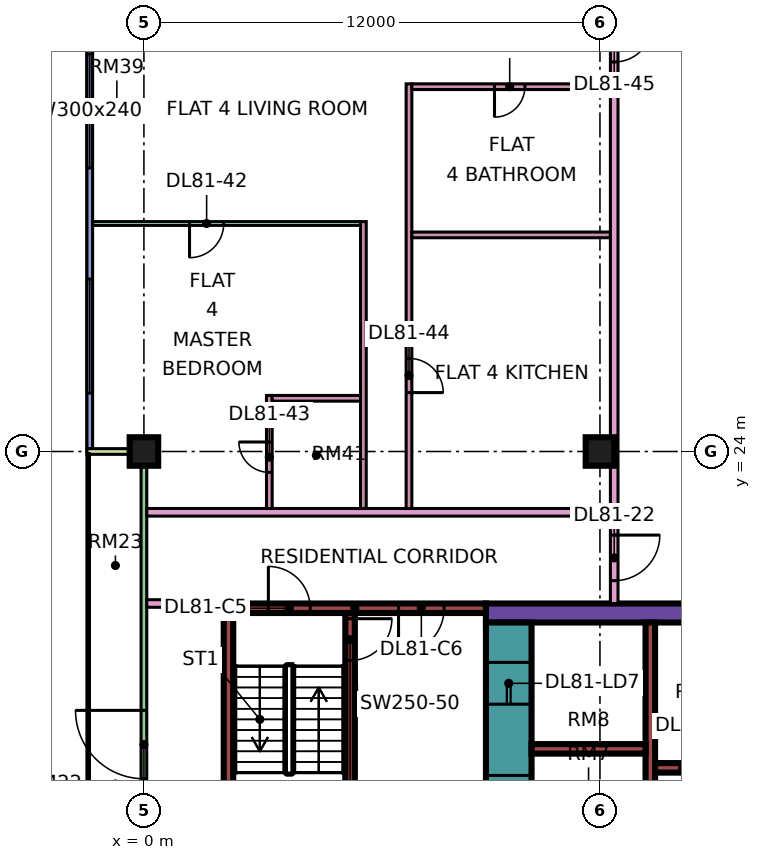
"""IFC4 building model, lengths in metres.
Left out: names, types, materials, properties, quantities, classifications, styles, units other than length and angle.
Written with IfcOpenShell. Run it as: python <this file> out.ifc"""

import sys

from ifc_helpers import new_model, si_unit, direction, frame, frame_2d, origin, origin_2d, place, context, subcontext, project, spatial, rectangle, extrude, element, fill, save


model = new_model("IFC4")
c1 = context("Model", 3, precision=1e-05, world=origin(), true_north=direction((0.0, 1.0)))
c2 = subcontext(c1, "Body", "Model", "MODEL_VIEW")
j1 = project(units=[si_unit("LENGTHUNIT", "METRE"), si_unit("PLANEANGLEUNIT", "RADIAN")], contexts=[c1])
p1 = place(None, origin())
s1 = spatial("IfcSite", under=j1, at=p1, CompositionType="ELEMENT")
p2 = place(p1, origin())
s2 = spatial("IfcBuilding", under=s1, at=p2, CompositionType="ELEMENT")
p3 = place(p2, frame((0.0, 0.0, 350.15)))
s3 = spatial("IfcBuildingStorey", under=s2, at=p3, CompositionType="ELEMENT", Elevation=350.15)
for number, where, z_axis, x_axis in (
    (1, (0.0, 24.0, 0.0), (0.0, 0.0, 1.0), (1.0, 0.0, 0.0)),
    (2, (12.0, 24.0, 0.0), (0.0, 0.0, 1.0), (1.0, 0.0, 0.0)),
):
    element("IfcColumn", number, at=place(p3, frame(where, z_axis=z_axis, x_axis=x_axis)), inside=s3, PredefinedType="COLUMN", context=c2, shape_type="SweptSolid", body=[
        extrude(rectangle(XDim=0.75, YDim=0.75, at=origin_2d()), origin(), (0.0, 0.0, 1.0), 3.75),
    ])
p4 = place(p3, frame((9.0, 19.75, 0.0), z_axis=(0.0, 0.0, 1.0), x_axis=(1.0, 0.0, 0.0)))
e3 = element("IfcWall", 3, at=p4, inside=s3, PredefinedType="SHEAR", context=c2, shape_type="SweptSolid", body=[
    extrude(rectangle(XDim=25.0, YDim=0.5, at=frame_2d((12.5, 0.0))), origin(), (0.0, 0.0, 1.0), 3.75),
])
p5 = place(p4, frame((19.1, 0.0, 0.0)))
e4 = element("IfcOpeningElement", 4, at=p5, cuts=e3, PredefinedType="OPENING", context=c2, shape_type="SweptSolid", body=[
    extrude(rectangle(XDim=1.8, YDim=2.4, at=frame_2d((0.9, 1.2))), frame((0.0, 0.26, 0.0), z_axis=(0.0, -1.0, 0.0), x_axis=(1.0, 0.0, 0.0)), (0.0, 0.0, 1.0), 0.52),
])
p6 = place(p3, frame((9.6, 7.5, 0.0), z_axis=(0.0, 0.0, 1.0), x_axis=(0.0, 1.0, 0.0)))
e5 = element("IfcWall", 5, at=p6, inside=s3, PredefinedType="SHEAR", context=c2, shape_type="SweptSolid", body=[
    extrude(rectangle(XDim=12.0, YDim=1.2, at=frame_2d((6.0, 0.0))), origin(), (0.0, 0.0, 1.0), 3.75),
])
p7 = place(p6, frame((4.375, 0.0, 0.0)))
e6 = element("IfcOpeningElement", 6, at=p7, cuts=e5, PredefinedType="OPENING", context=c2, shape_type="SweptSolid", body=[
    extrude(rectangle(XDim=1.1, YDim=2.2, at=frame_2d((0.55, 1.1))), frame((0.0, 0.61, 0.0), z_axis=(0.0, -1.0, 0.0), x_axis=(1.0, 0.0, 0.0)), (0.0, 0.0, 1.0), 1.22),
])
p8 = place(p6, frame((6.875, 0.0, 0.0)))
e7 = element("IfcOpeningElement", 7, at=p8, cuts=e5, PredefinedType="OPENING", context=c2, shape_type="SweptSolid", body=[
    extrude(rectangle(XDim=1.1, YDim=2.2, at=frame_2d((0.55, 1.1))), frame((0.0, 0.61, 0.0), z_axis=(0.0, -1.0, 0.0), x_axis=(1.0, 0.0, 0.0)), (0.0, 0.0, 1.0), 1.22),
])
p9 = place(p6, frame((9.85, 0.0, 0.0)))
e8 = element("IfcOpeningElement", 8, at=p9, cuts=e5, PredefinedType="OPENING", context=c2, shape_type="SweptSolid", body=[
    extrude(rectangle(XDim=1.1, YDim=2.2, at=frame_2d((0.55, 1.1))), frame((0.0, 0.61, 0.0), z_axis=(0.0, -1.0, 0.0), x_axis=(1.0, 0.0, 0.0)), (0.0, 0.0, 1.0), 1.22),
])
p10 = place(p6, frame((2.05, 0.0, 0.0)))
e9 = element("IfcOpeningElement", 9, at=p10, cuts=e5, PredefinedType="OPENING", context=c2, shape_type="SweptSolid", body=[
    extrude(rectangle(XDim=0.9, YDim=2.1, at=frame_2d((0.45, 1.05))), frame((0.0, 0.61, 0.0), z_axis=(0.0, -1.0, 0.0), x_axis=(1.0, 0.0, 0.0)), (0.0, 0.0, 1.0), 1.22),
])
p11 = place(p3, frame((13.325, 7.5, 0.0), z_axis=(0.0, 0.0, 1.0), x_axis=(0.0, 1.0, 0.0)))
e10 = element("IfcWall", 10, at=p11, inside=s3, PredefinedType="SHEAR", context=c2, shape_type="SweptSolid", body=[
    extrude(rectangle(XDim=12.0, YDim=0.25, at=frame_2d((6.0, 0.0))), origin(), (0.0, 0.0, 1.0), 3.75),
])
p12 = place(p3, frame((13.45, 15.675, 0.0), z_axis=(0.0, 0.0, 1.0), x_axis=(1.0, 0.0, 0.0)))
e11 = element("IfcWall", 11, at=p12, inside=s3, PredefinedType="SHEAR", context=c2, shape_type="SweptSolid", body=[
    extrude(rectangle(XDim=13.75, YDim=0.25, at=frame_2d((6.875, 0.0))), origin(), (0.0, 0.0, 1.0), 3.75),
])
p13 = place(p12, frame((0.65, 0.0, 0.0)))
e12 = element("IfcOpeningElement", 12, at=p13, cuts=e11, PredefinedType="OPENING", context=c2, shape_type="SweptSolid", body=[
    extrude(rectangle(XDim=1.2, YDim=2.2, at=frame_2d((0.6, 1.1))), frame((0.0, 0.135, 0.0), z_axis=(0.0, -1.0, 0.0), x_axis=(1.0, 0.0, 0.0)), (0.0, 0.0, 1.0), 0.27),
])
p14 = place(p12, frame((3.4, 0.0, 0.0)))
e13 = element("IfcOpeningElement", 13, at=p14, cuts=e11, PredefinedType="OPENING", context=c2, shape_type="SweptSolid", body=[
    extrude(rectangle(XDim=1.2, YDim=2.2, at=frame_2d((0.6, 1.1))), frame((0.0, 0.135, 0.0), z_axis=(0.0, -1.0, 0.0), x_axis=(1.0, 0.0, 0.0)), (0.0, 0.0, 1.0), 0.27),
])
p15 = place(p12, frame((6.15, 0.0, 0.0)))
e14 = element("IfcOpeningElement", 14, at=p15, cuts=e11, PredefinedType="OPENING", context=c2, shape_type="SweptSolid", body=[
    extrude(rectangle(XDim=1.2, YDim=2.2, at=frame_2d((0.6, 1.1))), frame((0.0, 0.135, 0.0), z_axis=(0.0, -1.0, 0.0), x_axis=(1.0, 0.0, 0.0)), (0.0, 0.0, 1.0), 0.27),
])
p16 = place(p12, frame((8.9, 0.0, 0.0)))
e15 = element("IfcOpeningElement", 15, at=p16, cuts=e11, PredefinedType="OPENING", context=c2, shape_type="SweptSolid", body=[
    extrude(rectangle(XDim=1.2, YDim=2.2, at=frame_2d((0.6, 1.1))), frame((0.0, 0.135, 0.0), z_axis=(0.0, -1.0, 0.0), x_axis=(1.0, 0.0, 0.0)), (0.0, 0.0, 1.0), 0.27),
])
p17 = place(p12, frame((11.8, 0.0, 0.0)))
e16 = element("IfcOpeningElement", 16, at=p17, cuts=e11, PredefinedType="OPENING", context=c2, shape_type="SweptSolid", body=[
    extrude(rectangle(XDim=0.9, YDim=2.1, at=frame_2d((0.45, 1.05))), frame((0.0, 0.135, 0.0), z_axis=(0.0, -1.0, 0.0), x_axis=(1.0, 0.0, 0.0)), (0.0, 0.0, 1.0), 0.27),
])
p18 = place(p3, frame((10.2, 16.175, 0.0), z_axis=(0.0, 0.0, 1.0), x_axis=(1.0, 0.0, 0.0)))
e17 = element("IfcWall", 17, at=p18, inside=s3, PredefinedType="SHEAR", context=c2, shape_type="SweptSolid", body=[
    extrude(rectangle(XDim=3.0, YDim=0.25, at=frame_2d((1.5, 0.0))), origin(), (0.0, 0.0, 1.0), 3.75),
])
p19 = place(p3, frame((2.1, 19.875, 0.0), z_axis=(0.0, 0.0, 1.0), x_axis=(1.0, 0.0, 0.0)))
e18 = element("IfcWall", 18, at=p19, inside=s3, PredefinedType="SHEAR", context=c2, shape_type="SweptSolid", body=[
    extrude(rectangle(XDim=6.9, YDim=0.25, at=frame_2d((3.45, 0.0))), origin(), (0.0, 0.0, 1.0), 3.75),
])
p20 = place(p19, frame((1.175, 0.0, 0.0)))
e19 = element("IfcOpeningElement", 19, at=p20, cuts=e18, PredefinedType="OPENING", context=c2, shape_type="SweptSolid", body=[
    extrude(rectangle(XDim=1.1, YDim=2.2, at=frame_2d((0.55, 1.1))), frame((0.0, 0.135, 0.0), z_axis=(0.0, -1.0, 0.0), x_axis=(1.0, 0.0, 0.0)), (0.0, 0.0, 1.0), 0.27),
])
p21 = place(p19, frame((4.6, 0.0, 0.0)))
e20 = element("IfcOpeningElement", 20, at=p21, cuts=e18, PredefinedType="OPENING", context=c2, shape_type="SweptSolid", body=[
    extrude(rectangle(XDim=1.2, YDim=2.2, at=frame_2d((0.6, 1.1))), frame((0.0, 0.135, 0.0), z_axis=(0.0, -1.0, 0.0), x_axis=(1.0, 0.0, 0.0)), (0.0, 0.0, 1.0), 0.27),
])
p22 = place(p3, frame((2.225, 13.25, 0.0), z_axis=(0.0, 0.0, 1.0), x_axis=(0.0, 1.0, 0.0)))
e21 = element("IfcWall", 21, at=p22, inside=s3, PredefinedType="SHEAR", context=c2, shape_type="SweptSolid", body=[
    extrude(rectangle(XDim=6.5, YDim=0.25, at=frame_2d((3.25, 0.0))), origin(), (0.0, 0.0, 1.0), 3.75),
])
p23 = place(p3, frame((5.425, 13.25, 0.0), z_axis=(0.0, 0.0, 1.0), x_axis=(0.0, 1.0, 0.0)))
e22 = element("IfcWall", 22, at=p23, inside=s3, PredefinedType="SHEAR", context=c2, shape_type="SweptSolid", body=[
    extrude(rectangle(XDim=6.5, YDim=0.25, at=frame_2d((3.25, 0.0))), origin(), (0.0, 0.0, 1.0), 3.75),
])
p24 = place(p23, frame((5.25, 0.0, 0.0)))
e23 = element("IfcOpeningElement", 23, at=p24, cuts=e22, PredefinedType="OPENING", context=c2, shape_type="SweptSolid", body=[
    extrude(rectangle(XDim=1.1, YDim=2.2, at=frame_2d((0.55, 1.1))), frame((0.0, 0.135, 0.0), z_axis=(0.0, -1.0, 0.0), x_axis=(1.0, 0.0, 0.0)), (0.0, 0.0, 1.0), 0.27),
])
p25 = place(p3, frame((-1.425, 35.925, 0.0), z_axis=(0.0, 0.0, 1.0), x_axis=(0.0, -1.0, 0.0)))
e24 = element("IfcWall", 24, at=p25, inside=s3, PredefinedType="SOLIDWALL", context=c2, shape_type="SweptSolid", body=[
    extrude(rectangle(XDim=11.85, YDim=0.15, at=frame_2d((5.925, 0.0))), origin(), (0.0, 0.0, 1.0), 3.35),
])
p26 = place(p25, frame((1.462, 0.0, 0.45)))
e25 = element("IfcOpeningElement", 25, at=p26, cuts=e24, PredefinedType="OPENING", context=c2, shape_type="SweptSolid", body=[
    extrude(rectangle(XDim=3.0, YDim=2.4, at=frame_2d((1.5, 1.2))), frame((0.0, 0.085, 0.0), z_axis=(0.0, -1.0, 0.0), x_axis=(1.0, 0.0, 0.0)), (0.0, 0.0, 1.0), 0.17),
])
p27 = place(p25, frame((7.387, 0.0, 0.45)))
e26 = element("IfcOpeningElement", 26, at=p27, cuts=e24, PredefinedType="OPENING", context=c2, shape_type="SweptSolid", body=[
    extrude(rectangle(XDim=3.0, YDim=2.4, at=frame_2d((1.5, 1.2))), frame((0.0, 0.085, 0.0), z_axis=(0.0, -1.0, 0.0), x_axis=(1.0, 0.0, 0.0)), (0.0, 0.0, 1.0), 0.17),
])
p28 = place(p3, frame((0.0, 23.925, 0.0), z_axis=(0.0, 0.0, 1.0), x_axis=(0.0, -1.0, 0.0)))
e27 = element("IfcWall", 27, at=p28, inside=s3, PredefinedType="SOLIDWALL", context=c2, shape_type="SweptSolid", body=[
    extrude(rectangle(XDim=11.35, YDim=0.15, at=frame_2d((5.675, 0.0))), origin(), (0.0, 0.0, 1.0), 3.35),
])
p29 = place(p28, frame((6.738, 0.0, 0.0)))
e28 = element("IfcOpeningElement", 28, at=p29, cuts=e27, PredefinedType="OPENING", context=c2, shape_type="SweptSolid", body=[
    extrude(rectangle(XDim=1.8, YDim=2.4, at=frame_2d((0.9, 1.2))), frame((0.0, 0.085, 0.0), z_axis=(0.0, -1.0, 0.0), x_axis=(1.0, 0.0, 0.0)), (0.0, 0.0, 1.0), 0.17),
])
p30 = place(p3, frame((-1.5, 24.0, 0.0), z_axis=(0.0, 0.0, 1.0), x_axis=(1.0, 0.0, 0.0)))
e29 = element("IfcWall", 29, at=p30, inside=s3, PredefinedType="SOLIDWALL", context=c2, shape_type="SweptSolid", body=[
    extrude(rectangle(XDim=1.5, YDim=0.15, at=frame_2d((0.75, 0.0))), origin(), (0.0, 0.0, 1.0), 3.35),
])
p31 = place(p3, frame((-1.35, 30.0, 0.0), z_axis=(0.0, 0.0, 1.0), x_axis=(1.0, 0.0, 0.0)))
e30 = element("IfcWall", 30, at=p31, inside=s3, PredefinedType="PARTITIONING", context=c2, shape_type="SweptSolid", body=[
    extrude(rectangle(XDim=7.05, YDim=0.1, at=frame_2d((3.525, 0.0))), origin(), (0.0, 0.0, 1.0), 3.35),
])
p32 = place(p31, frame((2.55, 0.0, 0.0)))
e31 = element("IfcOpeningElement", 31, at=p32, cuts=e30, PredefinedType="OPENING", context=c2, shape_type="SweptSolid", body=[
    extrude(rectangle(XDim=0.9, YDim=2.1, at=frame_2d((0.45, 1.05))), frame((0.0, 0.06, 0.0), z_axis=(0.0, -1.0, 0.0), x_axis=(1.0, 0.0, 0.0)), (0.0, 0.0, 1.0), 0.12),
])
p33 = place(p3, frame((0.074, 20.0, 0.0), z_axis=(0.0, 0.0, 1.0), x_axis=(1.0, 0.0, 0.0)))
e32 = element("IfcWall", 32, at=p33, inside=s3, PredefinedType="PARTITIONING", context=c2, shape_type="SweptSolid", body=[
    extrude(rectangle(XDim=2.026, YDim=0.2, at=frame_2d((1.013, 0.0))), origin(), (0.0, 0.0, 1.0), 3.35),
])
p34 = place(p3, frame((0.074, 22.4, 0.0), z_axis=(0.0, 0.0, 1.0), x_axis=(1.0, 0.0, 0.0)))
e33 = element("IfcWall", 33, at=p34, inside=s3, PredefinedType="PARTITIONING", context=c2, shape_type="SweptSolid", body=[
    extrude(rectangle(XDim=12.201, YDim=0.2, at=frame_2d((6.101, 0.0))), origin(), (0.0, 0.0, 1.0), 3.35),
])
p35 = place(p3, frame((3.3, 22.5, 0.0), z_axis=(0.0, 0.0, 1.0), x_axis=(0.0, 1.0, 0.0)))
e34 = element("IfcWall", 34, at=p35, inside=s3, PredefinedType="PARTITIONING", context=c2, shape_type="SweptSolid", body=[
    extrude(rectangle(XDim=2.975, YDim=0.15, at=frame_2d((1.488, 0.0))), origin(), (0.0, 0.0, 1.0), 3.35),
])
p36 = place(p35, frame((0.95, 0.0, 0.0)))
e35 = element("IfcOpeningElement", 35, at=p36, cuts=e34, PredefinedType="OPENING", context=c2, shape_type="SweptSolid", body=[
    extrude(rectangle(XDim=0.8, YDim=2.1, at=frame_2d((0.4, 1.05))), frame((0.0, 0.085, 0.0), z_axis=(0.0, -1.0, 0.0), x_axis=(1.0, 0.0, 0.0)), (0.0, 0.0, 1.0), 0.17),
])
p37 = place(p3, frame((3.375, 25.4, 0.0), z_axis=(0.0, 0.0, 1.0), x_axis=(1.0, 0.0, 0.0)))
e36 = element("IfcWall", 36, at=p37, inside=s3, PredefinedType="PARTITIONING", context=c2, shape_type="SweptSolid", body=[
    extrude(rectangle(XDim=2.325, YDim=0.15, at=frame_2d((1.163, 0.0))), origin(), (0.0, 0.0, 1.0), 3.35),
])
p38 = place(p3, frame((5.775, 22.5, 0.0), z_axis=(0.0, 0.0, 1.0), x_axis=(0.0, 1.0, 0.0)))
e37 = element("IfcWall", 37, at=p38, inside=s3, PredefinedType="PARTITIONING", context=c2, shape_type="SweptSolid", body=[
    extrude(rectangle(XDim=7.55, YDim=0.15, at=frame_2d((3.775, 0.0))), origin(), (0.0, 0.0, 1.0), 3.35),
])
p39 = place(p3, frame((6.975, 22.5, 0.0), z_axis=(0.0, 0.0, 1.0), x_axis=(0.0, 1.0, 0.0)))
e38 = element("IfcWall", 38, at=p39, inside=s3, PredefinedType="PARTITIONING", context=c2, shape_type="SweptSolid", body=[
    extrude(rectangle(XDim=11.175, YDim=0.15, at=frame_2d((5.587, 0.0))), origin(), (0.0, 0.0, 1.0), 3.35),
])
p40 = place(p39, frame((3.05, 0.0, 0.0)))
e39 = element("IfcOpeningElement", 39, at=p40, cuts=e38, PredefinedType="OPENING", context=c2, shape_type="SweptSolid", body=[
    extrude(rectangle(XDim=0.9, YDim=2.1, at=frame_2d((0.45, 1.05))), frame((0.0, 0.085, 0.0), z_axis=(0.0, -1.0, 0.0), x_axis=(1.0, 0.0, 0.0)), (0.0, 0.0, 1.0), 0.17),
])
p41 = place(p3, frame((7.05, 29.7, 0.0), z_axis=(0.0, 0.0, 1.0), x_axis=(1.0, 0.0, 0.0)))
e40 = element("IfcWall", 40, at=p41, inside=s3, PredefinedType="PARTITIONING", context=c2, shape_type="SweptSolid", body=[
    extrude(rectangle(XDim=5.225, YDim=0.15, at=frame_2d((2.612, 0.0))), origin(), (0.0, 0.0, 1.0), 3.35),
])
p42 = place(p3, frame((7.05, 33.6, 0.0), z_axis=(0.0, 0.0, 1.0), x_axis=(1.0, 0.0, 0.0)))
e41 = element("IfcWall", 41, at=p42, inside=s3, PredefinedType="PARTITIONING", context=c2, shape_type="SweptSolid", body=[
    extrude(rectangle(XDim=5.225, YDim=0.15, at=frame_2d((2.612, 0.0))), origin(), (0.0, 0.0, 1.0), 3.35),
])
p43 = place(p42, frame((2.175, 0.0, 0.0)))
e42 = element("IfcOpeningElement", 42, at=p43, cuts=e41, PredefinedType="OPENING", context=c2, shape_type="SweptSolid", body=[
    extrude(rectangle(XDim=0.8, YDim=2.1, at=frame_2d((0.4, 1.05))), frame((0.0, 0.085, 0.0), z_axis=(0.0, -1.0, 0.0), x_axis=(1.0, 0.0, 0.0)), (0.0, 0.0, 1.0), 0.17),
])
p44 = place(p3, frame((12.375, 20.0, 0.0), z_axis=(0.0, 0.0, 1.0), x_axis=(0.0, 1.0, 0.0)))
e43 = element("IfcWall", 43, at=p44, inside=s3, PredefinedType="PARTITIONING", context=c2, shape_type="SweptSolid", body=[
    extrude(rectangle(XDim=33.926, YDim=0.2, at=frame_2d((16.963, 0.0))), origin(), (0.0, 0.0, 1.0), 3.35),
])
p45 = place(p44, frame((16.95, 0.0, 0.0)))
e44 = element("IfcOpeningElement", 44, at=p45, cuts=e43, PredefinedType="OPENING", context=c2, shape_type="SweptSolid", body=[
    extrude(rectangle(XDim=1.0, YDim=2.1, at=frame_2d((0.5, 1.05))), frame((0.0, 0.11, 0.0), z_axis=(0.0, -1.0, 0.0), x_axis=(1.0, 0.0, 0.0)), (0.0, 0.0, 1.0), 0.22),
])
p46 = place(p44, frame((0.6, 0.0, 0.0)))
e45 = element("IfcOpeningElement", 45, at=p46, cuts=e43, PredefinedType="OPENING", context=c2, shape_type="SweptSolid", body=[
    extrude(rectangle(XDim=1.2, YDim=2.1, at=frame_2d((0.6, 1.05))), frame((0.0, 0.11, 0.0), z_axis=(0.0, -1.0, 0.0), x_axis=(1.0, 0.0, 0.0)), (0.0, 0.0, 1.0), 0.22),
])
p47 = place(p44, frame((14.25, 0.0, 0.0)))
e46 = element("IfcOpeningElement", 46, at=p47, cuts=e43, PredefinedType="OPENING", context=c2, shape_type="SweptSolid", body=[
    extrude(rectangle(XDim=1.0, YDim=2.1, at=frame_2d((0.5, 1.05))), frame((0.0, 0.11, 0.0), z_axis=(0.0, -1.0, 0.0), x_axis=(1.0, 0.0, 0.0)), (0.0, 0.0, 1.0), 0.22),
])
p48 = place(p26, origin())
e47 = element("IfcWindow", 47, at=p48, inside=s3, PartitioningType="SINGLE_PANEL", PredefinedType="WINDOW", context=c2, shape_type="SweptSolid", body=[
    extrude(rectangle(XDim=3.0, YDim=2.4, at=frame_2d((1.5, 1.2))), frame((0.0, 0.03, 0.0), z_axis=(0.0, -1.0, 0.0), x_axis=(1.0, 0.0, 0.0)), (0.0, 0.0, 1.0), 0.06),
])
fill(e25, e47)
p49 = place(p27, origin())
e48 = element("IfcWindow", 48, at=p49, inside=s3, PartitioningType="SINGLE_PANEL", PredefinedType="WINDOW", context=c2, shape_type="SweptSolid", body=[
    extrude(rectangle(XDim=3.0, YDim=2.4, at=frame_2d((1.5, 1.2))), frame((0.0, 0.03, 0.0), z_axis=(0.0, -1.0, 0.0), x_axis=(1.0, 0.0, 0.0)), (0.0, 0.0, 1.0), 0.06),
])
fill(e26, e48)
p50 = place(p29, frame((1.8, 0.0, 0.0), z_axis=(0.0, 0.0, 1.0), x_axis=(-1.0, 0.0, 0.0)))
e49 = element("IfcDoor", 49, at=p50, inside=s3, OperationType="DOUBLE_DOOR_SINGLE_SWING", PredefinedType="DOOR", context=c2, shape_type="SweptSolid", body=[
    extrude(rectangle(XDim=1.8, YDim=2.4, at=frame_2d((0.9, 1.2))), frame((0.0, 0.025, 0.0), z_axis=(0.0, -1.0, 0.0), x_axis=(1.0, 0.0, 0.0)), (0.0, 0.0, 1.0), 0.05),
])
fill(e28, e49)
p51 = place(p13, origin())
e50 = element("IfcDoor", 50, at=p51, inside=s3, OperationType="DOUBLE_DOOR_SLIDING", PredefinedType="DOOR", context=c2, shape_type="SweptSolid", body=[
    extrude(rectangle(XDim=1.2, YDim=2.2, at=frame_2d((0.6, 1.1))), frame((0.0, 0.025, 0.0), z_axis=(0.0, -1.0, 0.0), x_axis=(1.0, 0.0, 0.0)), (0.0, 0.0, 1.0), 0.05),
])
fill(e12, e50)
p52 = place(p8, origin())
e51 = element("IfcDoor", 51, at=p52, inside=s3, OperationType="DOUBLE_DOOR_SLIDING", PredefinedType="DOOR", context=c2, shape_type="SweptSolid", body=[
    extrude(rectangle(XDim=1.1, YDim=2.2, at=frame_2d((0.55, 1.1))), frame((0.0, 0.025, 0.0), z_axis=(0.0, -1.0, 0.0), x_axis=(1.0, 0.0, 0.0)), (0.0, 0.0, 1.0), 0.05),
])
fill(e7, e51)
p53 = place(p9, origin())
e52 = element("IfcDoor", 52, at=p53, inside=s3, OperationType="DOUBLE_DOOR_SLIDING", PredefinedType="DOOR", context=c2, shape_type="SweptSolid", body=[
    extrude(rectangle(XDim=1.1, YDim=2.2, at=frame_2d((0.55, 1.1))), frame((0.0, 0.025, 0.0), z_axis=(0.0, -1.0, 0.0), x_axis=(1.0, 0.0, 0.0)), (0.0, 0.0, 1.0), 0.05),
])
fill(e8, e52)
p54 = place(p24, origin())
e53 = element("IfcDoor", 53, at=p54, inside=s3, OperationType="SINGLE_SWING_RIGHT", PredefinedType="DOOR", context=c2, shape_type="SweptSolid", body=[
    extrude(rectangle(XDim=1.1, YDim=2.2, at=frame_2d((0.55, 1.1))), frame((0.0, 0.025, 0.0), z_axis=(0.0, -1.0, 0.0), x_axis=(1.0, 0.0, 0.0)), (0.0, 0.0, 1.0), 0.05),
])
fill(e23, e53)
p55 = place(p20, origin())
e54 = element("IfcDoor", 54, at=p55, inside=s3, OperationType="SINGLE_SWING_LEFT", PredefinedType="DOOR", context=c2, shape_type="SweptSolid", body=[
    extrude(rectangle(XDim=1.1, YDim=2.2, at=frame_2d((0.55, 1.1))), frame((0.0, 0.025, 0.0), z_axis=(0.0, -1.0, 0.0), x_axis=(1.0, 0.0, 0.0)), (0.0, 0.0, 1.0), 0.05),
])
fill(e19, e54)
p56 = place(p21, frame((1.2, 0.0, 0.0), z_axis=(0.0, 0.0, 1.0), x_axis=(-1.0, 0.0, 0.0)))
e55 = element("IfcDoor", 55, at=p56, inside=s3, OperationType="SINGLE_SWING_LEFT", PredefinedType="DOOR", context=c2, shape_type="SweptSolid", body=[
    extrude(rectangle(XDim=1.2, YDim=2.2, at=frame_2d((0.6, 1.1))), frame((0.0, 0.025, 0.0), z_axis=(0.0, -1.0, 0.0), x_axis=(1.0, 0.0, 0.0)), (0.0, 0.0, 1.0), 0.05),
])
fill(e20, e55)
p57 = place(p46, origin())
e56 = element("IfcDoor", 56, at=p57, inside=s3, OperationType="SINGLE_SWING_RIGHT", PredefinedType="DOOR", context=c2, shape_type="SweptSolid", body=[
    extrude(rectangle(XDim=1.2, YDim=2.1, at=frame_2d((0.6, 1.05))), frame((0.0, 0.025, 0.0), z_axis=(0.0, -1.0, 0.0), x_axis=(1.0, 0.0, 0.0)), (0.0, 0.0, 1.0), 0.05),
])
fill(e45, e56)
p58 = place(p43, frame((0.8, 0.0, 0.0), z_axis=(0.0, 0.0, 1.0), x_axis=(-1.0, 0.0, 0.0)))
e57 = element("IfcDoor", 57, at=p58, inside=s3, OperationType="SINGLE_SWING_LEFT", PredefinedType="DOOR", context=c2, shape_type="SweptSolid", body=[
    extrude(rectangle(XDim=0.8, YDim=2.1, at=frame_2d((0.4, 1.05))), frame((0.0, 0.025, 0.0), z_axis=(0.0, -1.0, 0.0), x_axis=(1.0, 0.0, 0.0)), (0.0, 0.0, 1.0), 0.05),
])
fill(e42, e57)
p59 = place(p32, frame((0.9, 0.0, 0.0), z_axis=(0.0, 0.0, 1.0), x_axis=(-1.0, 0.0, 0.0)))
e58 = element("IfcDoor", 58, at=p59, inside=s3, OperationType="SINGLE_SWING_LEFT", PredefinedType="DOOR", context=c2, shape_type="SweptSolid", body=[
    extrude(rectangle(XDim=0.9, YDim=2.1, at=frame_2d((0.45, 1.05))), frame((0.0, 0.025, 0.0), z_axis=(0.0, -1.0, 0.0), x_axis=(1.0, 0.0, 0.0)), (0.0, 0.0, 1.0), 0.05),
])
fill(e31, e58)
p60 = place(p36, frame((0.8, 0.0, 0.0), z_axis=(0.0, 0.0, 1.0), x_axis=(-1.0, 0.0, 0.0)))
e59 = element("IfcDoor", 59, at=p60, inside=s3, OperationType="SINGLE_SWING_RIGHT", PredefinedType="DOOR", context=c2, shape_type="SweptSolid", body=[
    extrude(rectangle(XDim=0.8, YDim=2.1, at=frame_2d((0.4, 1.05))), frame((0.0, 0.025, 0.0), z_axis=(0.0, -1.0, 0.0), x_axis=(1.0, 0.0, 0.0)), (0.0, 0.0, 1.0), 0.05),
])
fill(e35, e59)
p61 = place(p40, frame((0.9, 0.0, 0.0), z_axis=(0.0, 0.0, 1.0), x_axis=(-1.0, 0.0, 0.0)))
e60 = element("IfcDoor", 60, at=p61, inside=s3, OperationType="SINGLE_SWING_LEFT", PredefinedType="DOOR", context=c2, shape_type="SweptSolid", body=[
    extrude(rectangle(XDim=0.9, YDim=2.1, at=frame_2d((0.45, 1.05))), frame((0.0, 0.025, 0.0), z_axis=(0.0, -1.0, 0.0), x_axis=(1.0, 0.0, 0.0)), (0.0, 0.0, 1.0), 0.05),
])
fill(e39, e60)
p62 = place(p47, origin())
e61 = element("IfcDoor", 61, at=p62, inside=s3, OperationType="SINGLE_SWING_RIGHT", PredefinedType="DOOR", context=c2, shape_type="SweptSolid", body=[
    extrude(rectangle(XDim=1.0, YDim=2.1, at=frame_2d((0.5, 1.05))), frame((0.0, 0.025, 0.0), z_axis=(0.0, -1.0, 0.0), x_axis=(1.0, 0.0, 0.0)), (0.0, 0.0, 1.0), 0.05),
])
fill(e46, e61)
save(model, sys.argv[1])
